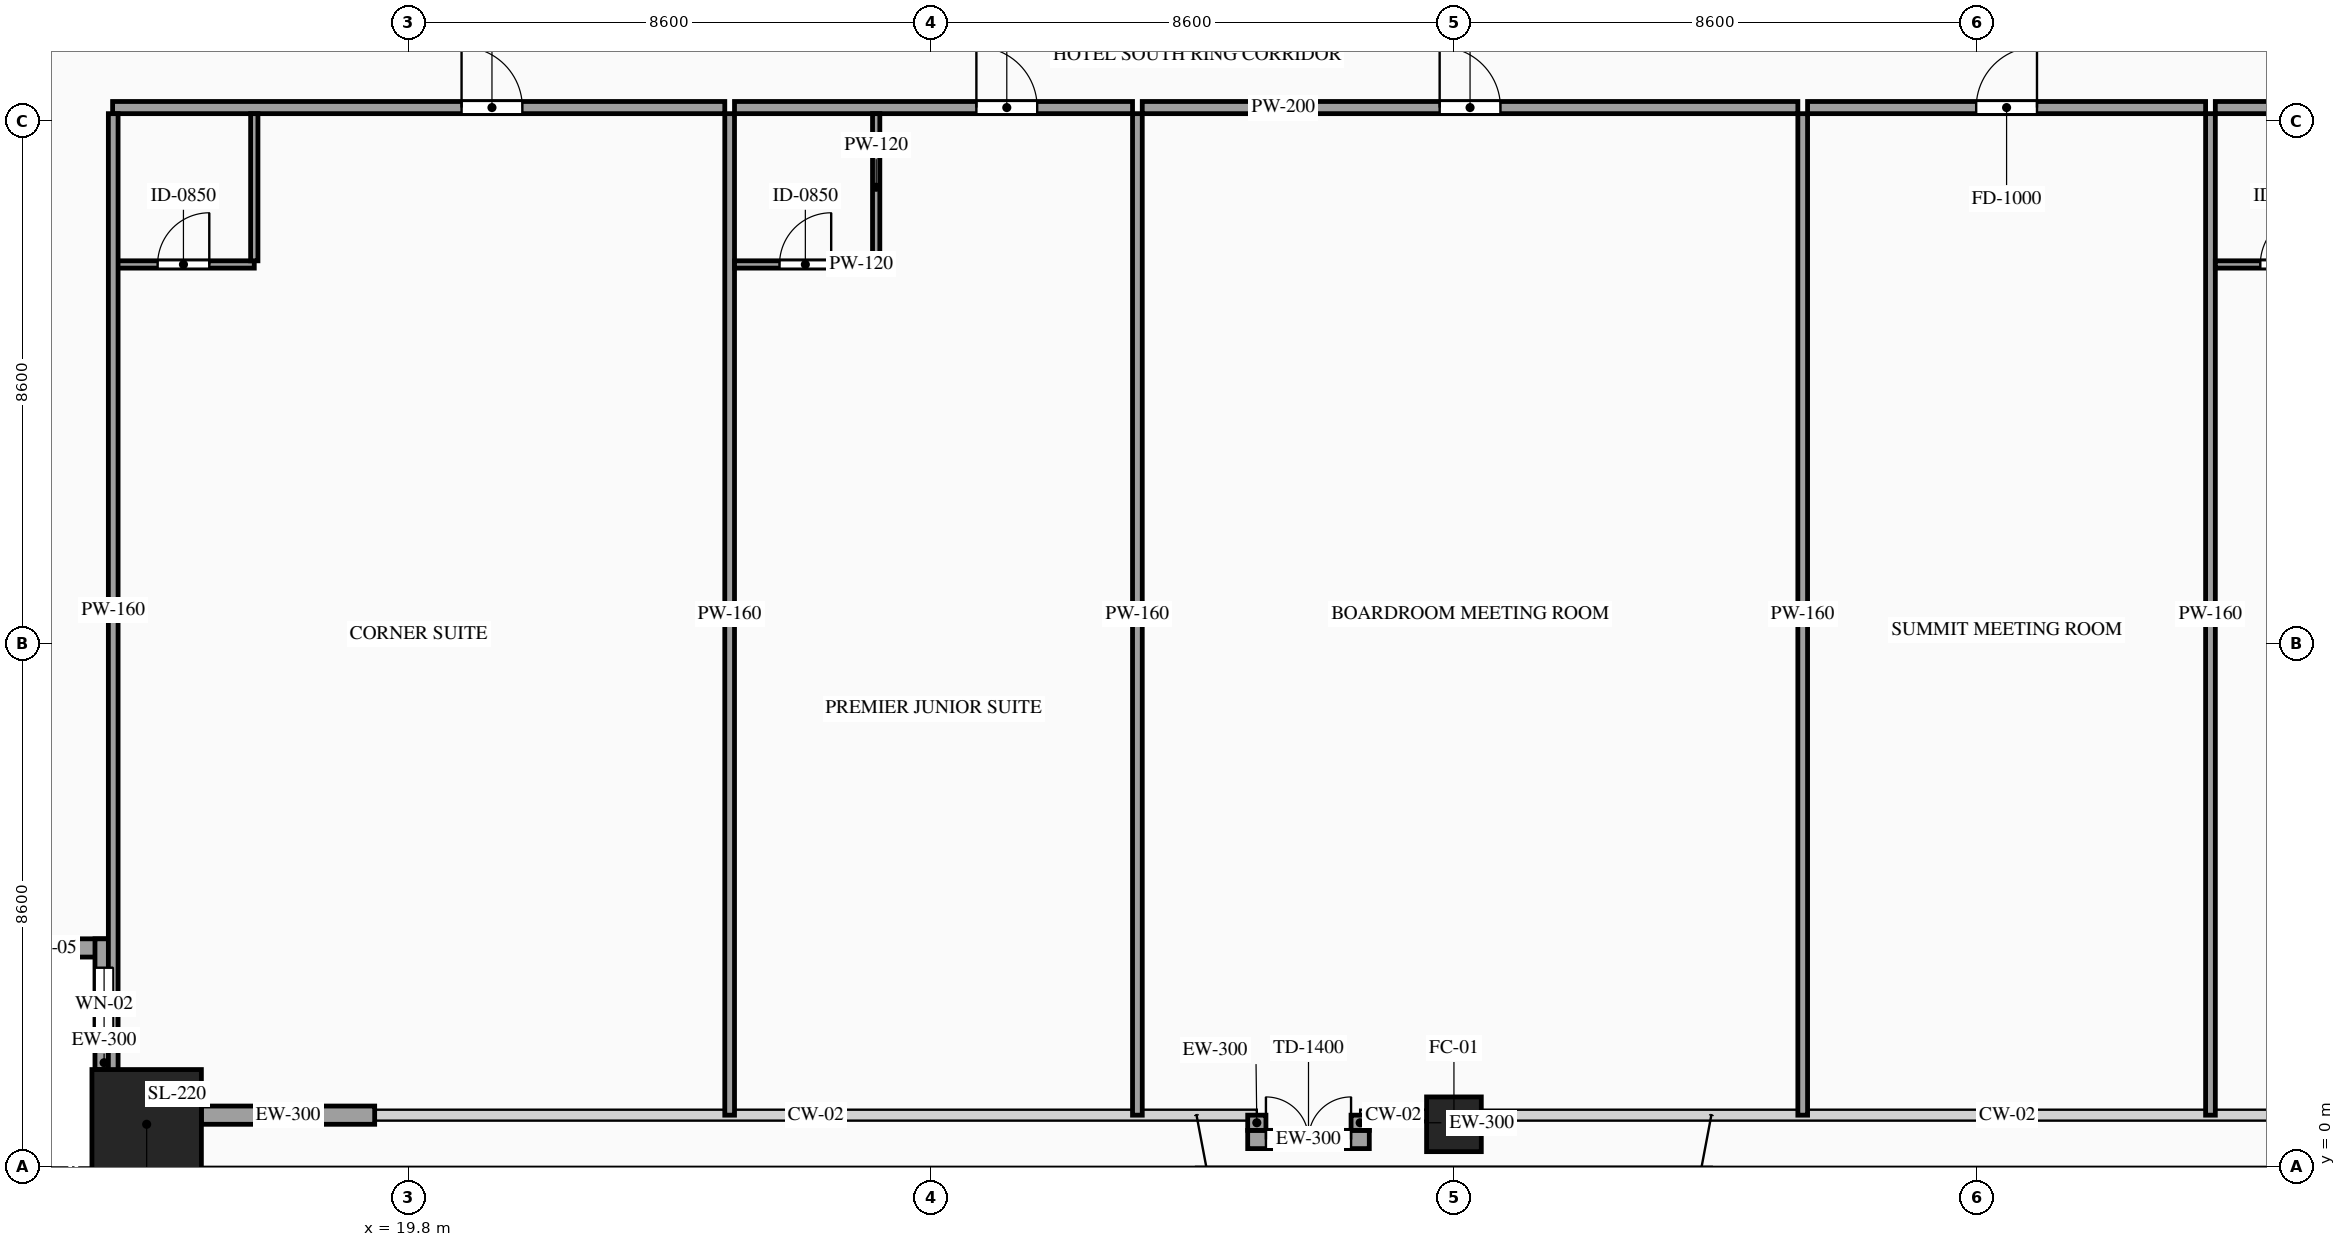
"""IFC4 building model, lengths in metres.
Left out: names, types, materials, properties, quantities, classifications, styles, units other than length and angle.
Written with IfcOpenShell. Run it as: python <this file> out.ifc"""

import sys

from ifc_helpers import new_model, si_unit, direction, frame, frame_2d, origin, origin_2d, place, context, subcontext, project, spatial, rectangle, hollow_rectangle, extrude, source, transform, mapped, element, fill, save


model = new_model("IFC4")
c1 = context("Model", 3, precision=1e-05, world=origin(), true_north=direction((0.0, 1.0)))
c2 = subcontext(c1, "Body", "Model", "MODEL_VIEW")
j1 = project(units=[si_unit("LENGTHUNIT", "METRE"), si_unit("PLANEANGLEUNIT", "RADIAN")], contexts=[c1])
p1 = place(None, origin())
s1 = spatial("IfcSite", under=j1, at=p1, CompositionType="ELEMENT")
p2 = place(p1, origin())
s2 = spatial("IfcBuilding", under=s1, at=p2, CompositionType="ELEMENT")
p3 = place(p2, frame((0.0, 0.0, 49.6)))
s3 = spatial("IfcBuildingStorey", under=s2, at=p3, CompositionType="ELEMENT", Elevation=49.6)
m1 = source(origin(), c2, "Body", "SweptSolid", [
    extrude(hollow_rectangle(XDim=1.8, YDim=1.8, WallThickness=0.08, at=origin_2d()), origin(), (0.0, 0.0, 1.0), 3.6),
])
p4 = place(p3, frame((15.5, 0.7, 0.0), z_axis=(0.0, 0.0, 1.0), x_axis=(1.0, 0.0, 0.0)))
e1 = element("IfcColumn", 1, at=p4, inside=s3, PredefinedType="COLUMN", context=c2, shape_type="MappedRepresentation", body=[
    mapped(m1, transform((0.0, 0.0, 0.0), scale=1.0)),
])
m2 = source(origin(), c2, "Body", "SweptSolid", [
    extrude(hollow_rectangle(XDim=0.9, YDim=0.9, WallThickness=0.042, at=origin_2d()), origin(), (0.0, 0.0, 1.0), 3.6),
])
p5 = place(p3, frame((37.0, 0.7, 0.0), z_axis=(0.0, 0.0, 1.0), x_axis=(1.0, 0.0, 0.0)))
e2 = element("IfcColumn", 2, at=p5, inside=s3, PredefinedType="COLUMN", context=c2, shape_type="MappedRepresentation", body=[
    mapped(m2, transform((0.0, 0.0, 0.0), scale=1.0)),
])
p6 = place(p3, frame((12.8, 3.6, 0.0), z_axis=(0.0, 0.0, 1.0), x_axis=(1.0, 0.0, 0.0)))
e3 = element("IfcWall", 3, at=p6, inside=s3, PredefinedType="SOLIDWALL", context=c2, shape_type="SweptSolid", body=[
    extrude(rectangle(XDim=2.15, YDim=0.3, at=frame_2d((1.075, 0.0))), origin(), (0.0, 0.0, 1.0), 3.38),
])
p7 = place(p6, frame((0.625, 0.0, 0.85)))
e4 = element("IfcOpeningElement", 4, at=p7, cuts=e3, PredefinedType="OPENING", context=c2, shape_type="SweptSolid", body=[
    extrude(rectangle(XDim=0.9, YDim=1.5, at=frame_2d((0.45, 0.75))), frame((0.0, 0.165, 0.0), z_axis=(0.0, -1.0, 0.0), x_axis=(1.0, 0.0, 0.0)), (0.0, 0.0, 1.0), 0.33),
])
p8 = place(p3, frame((14.8, 3.75, 0.0), z_axis=(0.0, 0.0, 1.0), x_axis=(0.0, -1.0, 0.0)))
e5 = element("IfcWall", 5, at=p8, inside=s3, PredefinedType="SOLIDWALL", context=c2, shape_type="SweptSolid", body=[
    extrude(rectangle(XDim=2.15, YDim=0.3, at=frame_2d((1.075, 0.0))), origin(), (0.0, 0.0, 1.0), 3.38),
])
p9 = place(p8, frame((0.475, 0.0, 0.85)))
e6 = element("IfcOpeningElement", 6, at=p9, cuts=e5, PredefinedType="OPENING", context=c2, shape_type="SweptSolid", body=[
    extrude(rectangle(XDim=1.2, YDim=2.1, at=frame_2d((0.6, 1.05))), frame((0.0, 0.165, 0.0), z_axis=(0.0, -1.0, 0.0), x_axis=(1.0, 0.0, 0.0)), (0.0, 0.0, 1.0), 0.33),
])
m3 = source(origin(), c2, "Body", "SweptSolid", [
    extrude(rectangle(XDim=2.85, YDim=0.3, at=frame_2d((1.425, 0.0))), origin(), (0.0, 0.0, 1.0), 2.775),
])
p10 = place(p3, frame((16.4, 0.85, 0.0), z_axis=(0.0, 0.0, 1.0), x_axis=(1.0, 0.0, 0.0)))
e7 = element("IfcWall", 7, at=p10, inside=s3, PredefinedType="SOLIDWALL", context=c2, shape_type="MappedRepresentation", body=[
    mapped(m3, transform((0.0, 0.0, 0.0), scale=1.0)),
])
p11 = place(p3, frame((33.608, 0.45, 0.0), z_axis=(0.0, 0.0, 1.0), x_axis=(1.0, 0.0, 0.0)))
e8 = element("IfcWall", 8, at=p11, inside=s3, PredefinedType="SOLIDWALL", context=c2, shape_type="SweptSolid", body=[
    extrude(rectangle(XDim=2.0, YDim=0.3, at=frame_2d((1.0, 0.0))), origin(), (0.0, 0.0, 1.0), 3.38),
])
p12 = place(p11, frame((0.3, 0.0, 0.0)))
e9 = element("IfcOpeningElement", 9, at=p12, cuts=e8, PredefinedType="OPENING", context=c2, shape_type="SweptSolid", body=[
    extrude(rectangle(XDim=1.4, YDim=2.3, at=frame_2d((0.7, 1.15))), frame((0.0, 0.165, 0.0), z_axis=(0.0, -1.0, 0.0), x_axis=(1.0, 0.0, 0.0)), (0.0, 0.0, 1.0), 0.33),
])
m4 = source(origin(), c2, "Body", "SweptSolid", [
    extrude(rectangle(XDim=0.25, YDim=0.3, at=frame_2d((0.125, 0.0))), origin(), (0.0, 0.0, 1.0), 3.38),
])
for number, where, z_axis, x_axis in (
    (10, (33.758, 0.85, 0.0), (0.0, 0.0, 1.0), (0.0, -1.0, 0.0)),
    (11, (35.458, 0.6, 0.0), (0.0, 0.0, 1.0), (0.0, 1.0, 0.0)),
):
    element("IfcWall", number, at=place(p3, frame(where, z_axis=z_axis, x_axis=x_axis)), inside=s3, PredefinedType="SOLIDWALL", context=c2, shape_type="MappedRepresentation", body=[
        mapped(m4, transform((0.0, 0.0, 0.0), scale=1.0)),
    ])
p13 = place(p3, frame((14.94, 17.42, 0.0), z_axis=(0.0, 0.0, 1.0), x_axis=(1.0, 0.0, 0.0)))
e12 = element("IfcWall", 12, at=p13, inside=s3, PredefinedType="PARTITIONING", context=c2, shape_type="SweptSolid", body=[
    extrude(rectangle(XDim=10.068, YDim=0.2, at=frame_2d((5.034, 0.0))), origin(), (0.0, 0.0, 1.0), 3.38),
])
p14 = place(p13, frame((5.739, 0.0, 0.0)))
e13 = element("IfcOpeningElement", 13, at=p14, cuts=e12, PredefinedType="OPENING", context=c2, shape_type="SweptSolid", body=[
    extrude(rectangle(XDim=1.0, YDim=2.2, at=frame_2d((0.5, 1.1))), frame((0.0, 0.115, 0.0), z_axis=(0.0, -1.0, 0.0), x_axis=(1.0, 0.0, 0.0)), (0.0, 0.0, 1.0), 0.23),
])
m5 = source(origin(), c2, "Body", "SweptSolid", [
    extrude(rectangle(XDim=16.47, YDim=0.16, at=frame_2d((8.235, 0.0))), origin(), (0.0, 0.0, 1.0), 3.38),
])
p15 = place(p3, frame((25.088, 0.85, 0.0), z_axis=(0.0, 0.0, 1.0), x_axis=(0.0, 1.0, 0.0)))
e14 = element("IfcWall", 14, at=p15, inside=s3, PredefinedType="PARTITIONING", context=c2, shape_type="MappedRepresentation", body=[
    mapped(m5, transform((0.0, 0.0, 0.0), scale=1.0)),
])
p16 = place(p3, frame((14.94, 14.84, 0.0), z_axis=(0.0, 0.0, 1.0), x_axis=(1.0, 0.0, 0.0)))
e15 = element("IfcWall", 15, at=p16, inside=s3, PredefinedType="PARTITIONING", context=c2, shape_type="SweptSolid", body=[
    extrude(rectangle(XDim=2.33, YDim=0.12, at=frame_2d((1.165, 0.0))), origin(), (0.0, 0.0, 1.0), 3.38),
])
p17 = place(p16, frame((0.74, 0.0, 0.0)))
e16 = element("IfcOpeningElement", 16, at=p17, cuts=e15, PredefinedType="OPENING", context=c2, shape_type="SweptSolid", body=[
    extrude(rectangle(XDim=0.85, YDim=2.1, at=frame_2d((0.425, 1.05))), frame((0.0, 0.075, 0.0), z_axis=(0.0, -1.0, 0.0), x_axis=(1.0, 0.0, 0.0)), (0.0, 0.0, 1.0), 0.15),
])
m6 = source(origin(), c2, "Body", "SweptSolid", [
    extrude(rectangle(XDim=2.42, YDim=0.12, at=frame_2d((1.21, 0.0))), origin(), (0.0, 0.0, 1.0), 3.38),
])
p18 = place(p3, frame((17.27, 14.9, 0.0), z_axis=(0.0, 0.0, 1.0), x_axis=(0.0, 1.0, 0.0)))
e17 = element("IfcWall", 17, at=p18, inside=s3, PredefinedType="PARTITIONING", context=c2, shape_type="MappedRepresentation", body=[
    mapped(m6, transform((0.0, 0.0, 0.0), scale=1.0)),
])
p19 = place(p3, frame((25.168, 17.42, 0.0), z_axis=(0.0, 0.0, 1.0), x_axis=(1.0, 0.0, 0.0)))
e18 = element("IfcWall", 18, at=p19, inside=s3, PredefinedType="PARTITIONING", context=c2, shape_type="SweptSolid", body=[
    extrude(rectangle(XDim=6.546, YDim=0.2, at=frame_2d((3.273, 0.0))), origin(), (0.0, 0.0, 1.0), 3.38),
])
p20 = place(p19, frame((3.978, 0.0, 0.0)))
e19 = element("IfcOpeningElement", 19, at=p20, cuts=e18, PredefinedType="OPENING", context=c2, shape_type="SweptSolid", body=[
    extrude(rectangle(XDim=1.0, YDim=2.2, at=frame_2d((0.5, 1.1))), frame((0.0, 0.115, 0.0), z_axis=(0.0, -1.0, 0.0), x_axis=(1.0, 0.0, 0.0)), (0.0, 0.0, 1.0), 0.23),
])
p21 = place(p3, frame((31.794, 0.85, 0.0), z_axis=(0.0, 0.0, 1.0), x_axis=(0.0, 1.0, 0.0)))
e20 = element("IfcWall", 20, at=p21, inside=s3, PredefinedType="PARTITIONING", context=c2, shape_type="MappedRepresentation", body=[
    mapped(m5, transform((0.0, 0.0, 0.0), scale=1.0)),
])
p22 = place(p3, frame((25.168, 14.84, 0.0), z_axis=(0.0, 0.0, 1.0), x_axis=(1.0, 0.0, 0.0)))
e21 = element("IfcWall", 21, at=p22, inside=s3, PredefinedType="PARTITIONING", context=c2, shape_type="SweptSolid", body=[
    extrude(rectangle(XDim=2.33, YDim=0.12, at=frame_2d((1.165, 0.0))), origin(), (0.0, 0.0, 1.0), 3.38),
])
p23 = place(p22, frame((0.74, 0.0, 0.0)))
e22 = element("IfcOpeningElement", 22, at=p23, cuts=e21, PredefinedType="OPENING", context=c2, shape_type="SweptSolid", body=[
    extrude(rectangle(XDim=0.85, YDim=2.1, at=frame_2d((0.425, 1.05))), frame((0.0, 0.075, 0.0), z_axis=(0.0, -1.0, 0.0), x_axis=(1.0, 0.0, 0.0)), (0.0, 0.0, 1.0), 0.15),
])
p24 = place(p3, frame((27.498, 14.9, 0.0), z_axis=(0.0, 0.0, 1.0), x_axis=(0.0, 1.0, 0.0)))
e23 = element("IfcWall", 23, at=p24, inside=s3, PredefinedType="PARTITIONING", context=c2, shape_type="MappedRepresentation", body=[
    mapped(m6, transform((0.0, 0.0, 0.0), scale=1.0)),
])
p25 = place(p3, frame((31.874, 17.42, 0.0), z_axis=(0.0, 0.0, 1.0), x_axis=(1.0, 0.0, 0.0)))
e24 = element("IfcWall", 24, at=p25, inside=s3, PredefinedType="PARTITIONING", context=c2, shape_type="SweptSolid", body=[
    extrude(rectangle(XDim=10.782, YDim=0.2, at=frame_2d((5.391, 0.0))), origin(), (0.0, 0.0, 1.0), 3.38),
])
p26 = place(p25, frame((4.891, 0.0, 0.0)))
e25 = element("IfcOpeningElement", 25, at=p26, cuts=e24, PredefinedType="OPENING", context=c2, shape_type="SweptSolid", body=[
    extrude(rectangle(XDim=1.0, YDim=2.2, at=frame_2d((0.5, 1.1))), frame((0.0, 0.115, 0.0), z_axis=(0.0, -1.0, 0.0), x_axis=(1.0, 0.0, 0.0)), (0.0, 0.0, 1.0), 0.23),
])
p27 = place(p3, frame((42.736, 0.85, 0.0), z_axis=(0.0, 0.0, 1.0), x_axis=(0.0, 1.0, 0.0)))
e26 = element("IfcWall", 26, at=p27, inside=s3, PredefinedType="PARTITIONING", context=c2, shape_type="MappedRepresentation", body=[
    mapped(m5, transform((0.0, 0.0, 0.0), scale=1.0)),
])
p28 = place(p3, frame((42.816, 17.42, 0.0), z_axis=(0.0, 0.0, 1.0), x_axis=(1.0, 0.0, 0.0)))
e27 = element("IfcWall", 27, at=p28, inside=s3, PredefinedType="PARTITIONING", context=c2, shape_type="SweptSolid", body=[
    extrude(rectangle(XDim=6.546, YDim=0.2, at=frame_2d((3.273, 0.0))), origin(), (0.0, 0.0, 1.0), 3.38),
])
p29 = place(p28, frame((2.773, 0.0, 0.0)))
e28 = element("IfcOpeningElement", 28, at=p29, cuts=e27, PredefinedType="OPENING", context=c2, shape_type="SweptSolid", body=[
    extrude(rectangle(XDim=1.0, YDim=2.2, at=frame_2d((0.5, 1.1))), frame((0.0, 0.115, 0.0), z_axis=(0.0, -1.0, 0.0), x_axis=(1.0, 0.0, 0.0)), (0.0, 0.0, 1.0), 0.23),
])
p30 = place(p3, frame((49.442, 0.85, 0.0), z_axis=(0.0, 0.0, 1.0), x_axis=(0.0, 1.0, 0.0)))
e29 = element("IfcWall", 29, at=p30, inside=s3, PredefinedType="PARTITIONING", context=c2, shape_type="MappedRepresentation", body=[
    mapped(m5, transform((0.0, 0.0, 0.0), scale=1.0)),
])
p31 = place(p3, frame((49.522, 17.42, 0.0), z_axis=(0.0, 0.0, 1.0), x_axis=(1.0, 0.0, 0.0)))
e30 = element("IfcWall", 30, at=p31, inside=s3, PredefinedType="PARTITIONING", context=c2, shape_type="SweptSolid", body=[
    extrude(rectangle(XDim=9.538, YDim=0.2, at=frame_2d((4.769, 0.0))), origin(), (0.0, 0.0, 1.0), 3.38),
])
p32 = place(p31, frame((5.474, 0.0, 0.0)))
e31 = element("IfcOpeningElement", 31, at=p32, cuts=e30, PredefinedType="OPENING", context=c2, shape_type="SweptSolid", body=[
    extrude(rectangle(XDim=1.0, YDim=2.2, at=frame_2d((0.5, 1.1))), frame((0.0, 0.115, 0.0), z_axis=(0.0, -1.0, 0.0), x_axis=(1.0, 0.0, 0.0)), (0.0, 0.0, 1.0), 0.23),
])
m7 = source(origin(), c2, "Body", "SweptSolid", [
    extrude(rectangle(XDim=16.32, YDim=0.16, at=frame_2d((8.16, 0.0))), origin(), (0.0, 0.0, 1.0), 3.38),
])
p33 = place(p3, frame((14.95, 1.0, 0.0), z_axis=(0.0, 0.0, 1.0), x_axis=(0.0, 1.0, 0.0)))
e32 = element("IfcWall", 32, at=p33, inside=s3, PredefinedType="PARTITIONING", context=c2, shape_type="MappedRepresentation", body=[
    mapped(m7, transform((0.0, 0.0, 0.0), scale=1.0)),
])
p34 = place(p3, frame((49.522, 14.84, 0.0), z_axis=(0.0, 0.0, 1.0), x_axis=(1.0, 0.0, 0.0)))
e33 = element("IfcWall", 33, at=p34, inside=s3, PredefinedType="PARTITIONING", context=c2, shape_type="SweptSolid", body=[
    extrude(rectangle(XDim=2.33, YDim=0.12, at=frame_2d((1.165, 0.0))), origin(), (0.0, 0.0, 1.0), 3.38),
])
p35 = place(p34, frame((0.74, 0.0, 0.0)))
e34 = element("IfcOpeningElement", 34, at=p35, cuts=e33, PredefinedType="OPENING", context=c2, shape_type="SweptSolid", body=[
    extrude(rectangle(XDim=0.85, YDim=2.1, at=frame_2d((0.425, 1.05))), frame((0.0, 0.075, 0.0), z_axis=(0.0, -1.0, 0.0), x_axis=(1.0, 0.0, 0.0)), (0.0, 0.0, 1.0), 0.15),
])
m8 = source(origin(), c2, "Body", "SweptSolid", [
    extrude(rectangle(XDim=0.9, YDim=1.5, at=frame_2d((0.45, 0.75))), frame((0.0, 0.03, 0.0), z_axis=(0.0, -1.0, 0.0), x_axis=(1.0, 0.0, 0.0)), (0.0, 0.0, 1.0), 0.06),
])
p36 = place(p7, origin())
e35 = element("IfcWindow", 35, at=p36, inside=s3, PartitioningType="SINGLE_PANEL", PredefinedType="WINDOW", context=c2, shape_type="MappedRepresentation", body=[
    mapped(m8, transform((0.0, 0.0, 0.0), scale=1.0)),
])
fill(e4, e35)
m9 = source(origin(), c2, "Body", "SweptSolid", [
    extrude(rectangle(XDim=1.2, YDim=2.1, at=frame_2d((0.6, 1.05))), frame((0.0, 0.03, 0.0), z_axis=(0.0, -1.0, 0.0), x_axis=(1.0, 0.0, 0.0)), (0.0, 0.0, 1.0), 0.06),
])
p37 = place(p9, origin())
e36 = element("IfcWindow", 36, at=p37, inside=s3, PartitioningType="SINGLE_PANEL", PredefinedType="WINDOW", context=c2, shape_type="MappedRepresentation", body=[
    mapped(m9, transform((0.0, 0.0, 0.0), scale=1.0)),
])
fill(e6, e36)
m10 = source(origin(), c2, "Body", "SweptSolid", [
    extrude(rectangle(XDim=1.4, YDim=2.3, at=frame_2d((0.7, 1.15))), frame((0.0, 0.025, 0.0), z_axis=(0.0, -1.0, 0.0), x_axis=(1.0, 0.0, 0.0)), (0.0, 0.0, 1.0), 0.05),
])
p38 = place(p12, origin())
e37 = element("IfcDoor", 37, at=p38, inside=s3, OperationType="DOUBLE_DOOR_SINGLE_SWING", PredefinedType="DOOR", context=c2, shape_type="MappedRepresentation", body=[
    mapped(m10, transform((0.0, 0.0, 0.0), scale=1.0)),
])
fill(e9, e37)
m11 = source(origin(), c2, "Body", "SweptSolid", [
    extrude(rectangle(XDim=1.0, YDim=2.2, at=frame_2d((0.5, 1.1))), frame((0.0, 0.025, 0.0), z_axis=(0.0, -1.0, 0.0), x_axis=(1.0, 0.0, 0.0)), (0.0, 0.0, 1.0), 0.05),
])
p39 = place(p14, origin())
e38 = element("IfcDoor", 38, at=p39, inside=s3, OperationType="SINGLE_SWING_LEFT", PredefinedType="DOOR", context=c2, shape_type="MappedRepresentation", body=[
    mapped(m11, transform((0.0, 0.0, 0.0), scale=1.0)),
])
fill(e13, e38)
m12 = source(origin(), c2, "Body", "SweptSolid", [
    extrude(rectangle(XDim=0.85, YDim=2.1, at=frame_2d((0.425, 1.05))), frame((0.0, 0.025, 0.0), z_axis=(0.0, -1.0, 0.0), x_axis=(1.0, 0.0, 0.0)), (0.0, 0.0, 1.0), 0.05),
])
p40 = place(p17, origin())
e39 = element("IfcDoor", 39, at=p40, inside=s3, OperationType="SINGLE_SWING_RIGHT", PredefinedType="DOOR", context=c2, shape_type="MappedRepresentation", body=[
    mapped(m12, transform((0.0, 0.0, 0.0), scale=1.0)),
])
fill(e16, e39)
p41 = place(p20, origin())
e40 = element("IfcDoor", 40, at=p41, inside=s3, OperationType="SINGLE_SWING_LEFT", PredefinedType="DOOR", context=c2, shape_type="MappedRepresentation", body=[
    mapped(m11, transform((0.0, 0.0, 0.0), scale=1.0)),
])
fill(e19, e40)
p42 = place(p23, origin())
e41 = element("IfcDoor", 41, at=p42, inside=s3, OperationType="SINGLE_SWING_RIGHT", PredefinedType="DOOR", context=c2, shape_type="MappedRepresentation", body=[
    mapped(m12, transform((0.0, 0.0, 0.0), scale=1.0)),
])
fill(e22, e41)
p43 = place(p26, origin())
e42 = element("IfcDoor", 42, at=p43, inside=s3, OperationType="SINGLE_SWING_LEFT", PredefinedType="DOOR", context=c2, shape_type="MappedRepresentation", body=[
    mapped(m11, transform((0.0, 0.0, 0.0), scale=1.0)),
])
fill(e25, e42)
p44 = place(p29, origin())
e43 = element("IfcDoor", 43, at=p44, inside=s3, OperationType="SINGLE_SWING_RIGHT", PredefinedType="DOOR", context=c2, shape_type="MappedRepresentation", body=[
    mapped(m11, transform((0.0, 0.0, 0.0), scale=1.0)),
])
fill(e28, e43)
p45 = place(p35, origin())
e44 = element("IfcDoor", 44, at=p45, inside=s3, OperationType="SINGLE_SWING_RIGHT", PredefinedType="DOOR", context=c2, shape_type="MappedRepresentation", body=[
    mapped(m12, transform((0.0, 0.0, 0.0), scale=1.0)),
])
fill(e34, e44)
save(model, sys.argv[1])
